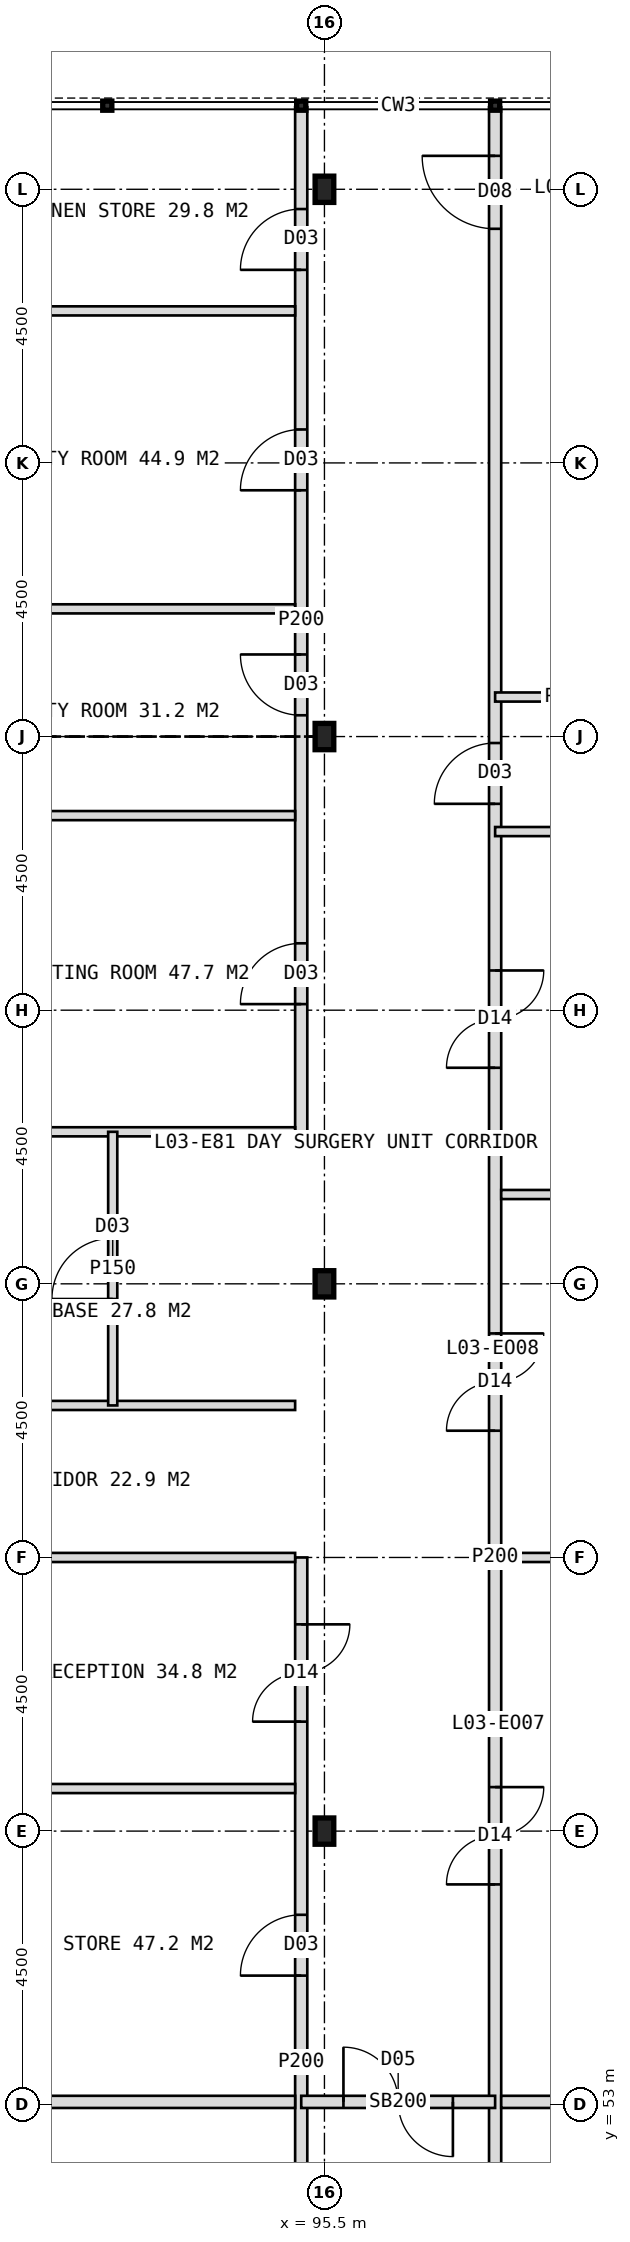
"""IFC4 building model, lengths in metres.
Left out: names, types, materials, properties, quantities, classifications, styles, units other than length and angle.
Written with IfcOpenShell. Run it as: python <this file> out.ifc"""

import sys

from ifc_helpers import new_model, si_unit, direction, frame, frame_2d, origin, origin_2d, place, context, subcontext, project, spatial, rectangle, i_section, extrude, element, fill, save


model = new_model("IFC4")
c1 = context("Model", 3, precision=1e-05, world=origin(), true_north=direction((0.0, 1.0)))
c2 = subcontext(c1, "Body", "Model", "MODEL_VIEW")
j1 = project(units=[si_unit("LENGTHUNIT", "METRE"), si_unit("PLANEANGLEUNIT", "RADIAN")], contexts=[c1])
p1 = place(None, origin())
s1 = spatial("IfcSite", under=j1, at=p1, CompositionType="ELEMENT")
p2 = place(p1, origin())
s2 = spatial("IfcBuilding", under=s1, at=p2, CompositionType="ELEMENT")
p3 = place(p2, frame((0.0, 0.0, 16.5)))
s3 = spatial("IfcBuildingStorey", under=s2, at=p3, CompositionType="ELEMENT", Elevation=16.5)
for number, where, z_axis, x_axis in (
    (1, (95.5, 57.5, 0.0), (0.0, 0.0, 1.0), (1.0, 0.0, 0.0)),
    (2, (95.5, 66.5, 0.0), (0.0, 0.0, 1.0), (1.0, 0.0, 0.0)),
    (3, (95.5, 75.5, 0.0), (0.0, 0.0, 1.0), (1.0, 0.0, 0.0)),
    (4, (95.5, 84.5, 0.0), (0.0, 0.0, 1.0), (1.0, 0.0, 0.0)),
):
    element("IfcColumn", number, at=place(p3, frame(where, z_axis=z_axis, x_axis=x_axis)), inside=s3, PredefinedType="COLUMN", context=c2, shape_type="SweptSolid", body=[
        extrude(i_section(OverallWidth=0.307, OverallDepth=0.432, WebThickness=0.021, FlangeThickness=0.04, FilletRadius=0.027, at=origin_2d()), origin(), (0.0, 0.0, 1.0), 4.5),
    ])
p4 = place(p3, frame((98.307, 38.15, 0.0), z_axis=(0.0, 0.0, 1.0), x_axis=(0.0, 1.0, 0.0)))
e5 = element("IfcWall", 5, at=p4, inside=s3, PredefinedType="PARTITIONING", context=c2, shape_type="SweptSolid", body=[
    extrude(rectangle(XDim=47.7, YDim=0.2, at=frame_2d((23.85, 0.0))), origin(), (0.0, 0.0, 1.0), 4.2),
])
p5 = place(p4, frame((45.7, 0.0, 0.0)))
e6 = element("IfcOpeningElement", 6, at=p5, cuts=e5, PredefinedType="OPENING", context=c2, shape_type="SweptSolid", body=[
    extrude(rectangle(XDim=1.2, YDim=2.1, at=frame_2d((0.6, 1.05))), frame((0.0, 0.11, 0.0), z_axis=(0.0, -1.0, 0.0), x_axis=(1.0, 0.0, 0.0)), (0.0, 0.0, 1.0), 0.22),
])
p6 = place(p4, frame((36.244, 0.0, 0.0)))
e7 = element("IfcOpeningElement", 7, at=p6, cuts=e5, PredefinedType="OPENING", context=c2, shape_type="SweptSolid", body=[
    extrude(rectangle(XDim=1.0, YDim=2.1, at=frame_2d((0.5, 1.05))), frame((0.0, 0.11, 0.0), z_axis=(0.0, -1.0, 0.0), x_axis=(1.0, 0.0, 0.0)), (0.0, 0.0, 1.0), 0.22),
])
p7 = place(p4, frame((0.73, 0.0, 0.0)))
e8 = element("IfcOpeningElement", 8, at=p7, cuts=e5, PredefinedType="OPENING", context=c2, shape_type="SweptSolid", body=[
    extrude(rectangle(XDim=1.4, YDim=2.2, at=frame_2d((0.7, 1.1))), frame((0.0, 0.11, 0.0), z_axis=(0.0, -1.0, 0.0), x_axis=(1.0, 0.0, 0.0)), (0.0, 0.0, 1.0), 0.22),
])
p8 = place(p4, frame((5.144, 0.0, 0.0)))
e9 = element("IfcOpeningElement", 9, at=p8, cuts=e5, PredefinedType="OPENING", context=c2, shape_type="SweptSolid", body=[
    extrude(rectangle(XDim=1.4, YDim=2.2, at=frame_2d((0.7, 1.1))), frame((0.0, 0.11, 0.0), z_axis=(0.0, -1.0, 0.0), x_axis=(1.0, 0.0, 0.0)), (0.0, 0.0, 1.0), 0.22),
])
p9 = place(p4, frame((9.82, 0.0, 0.0)))
e10 = element("IfcOpeningElement", 10, at=p9, cuts=e5, PredefinedType="OPENING", context=c2, shape_type="SweptSolid", body=[
    extrude(rectangle(XDim=1.0, YDim=2.1, at=frame_2d((0.5, 1.05))), frame((0.0, 0.11, 0.0), z_axis=(0.0, -1.0, 0.0), x_axis=(1.0, 0.0, 0.0)), (0.0, 0.0, 1.0), 0.22),
])
p10 = place(p4, frame((12.805, 0.0, 0.0)))
e11 = element("IfcOpeningElement", 11, at=p10, cuts=e5, PredefinedType="OPENING", context=c2, shape_type="SweptSolid", body=[
    extrude(rectangle(XDim=1.0, YDim=2.1, at=frame_2d((0.5, 1.05))), frame((0.0, 0.11, 0.0), z_axis=(0.0, -1.0, 0.0), x_axis=(1.0, 0.0, 0.0)), (0.0, 0.0, 1.0), 0.22),
])
p11 = place(p4, frame((18.473, 0.0, 0.0)))
e12 = element("IfcOpeningElement", 12, at=p11, cuts=e5, PredefinedType="OPENING", context=c2, shape_type="SweptSolid", body=[
    extrude(rectangle(XDim=1.6, YDim=2.2, at=frame_2d((0.8, 1.1))), frame((0.0, 0.11, 0.0), z_axis=(0.0, -1.0, 0.0), x_axis=(1.0, 0.0, 0.0)), (0.0, 0.0, 1.0), 0.22),
])
p12 = place(p4, frame((25.934, 0.0, 0.0)))
e13 = element("IfcOpeningElement", 13, at=p12, cuts=e5, PredefinedType="OPENING", context=c2, shape_type="SweptSolid", body=[
    extrude(rectangle(XDim=1.6, YDim=2.2, at=frame_2d((0.8, 1.1))), frame((0.0, 0.11, 0.0), z_axis=(0.0, -1.0, 0.0), x_axis=(1.0, 0.0, 0.0)), (0.0, 0.0, 1.0), 0.22),
])
p13 = place(p4, frame((31.903, 0.0, 0.0)))
e14 = element("IfcOpeningElement", 14, at=p13, cuts=e5, PredefinedType="OPENING", context=c2, shape_type="SweptSolid", body=[
    extrude(rectangle(XDim=1.6, YDim=2.2, at=frame_2d((0.8, 1.1))), frame((0.0, 0.11, 0.0), z_axis=(0.0, -1.0, 0.0), x_axis=(1.0, 0.0, 0.0)), (0.0, 0.0, 1.0), 0.22),
])
p14 = place(p3, frame((95.118, 45.4, 0.0), z_axis=(0.0, 0.0, 1.0), x_axis=(0.0, 1.0, 0.0)))
e15 = element("IfcWall", 15, at=p14, inside=s3, PredefinedType="PARTITIONING", context=c2, shape_type="SweptSolid", body=[
    extrude(rectangle(XDim=16.6, YDim=0.2, at=frame_2d((8.3, 0.0))), origin(), (0.0, 0.0, 1.0), 4.2),
])
p15 = place(p14, frame((1.65, 0.0, 0.0)))
e16 = element("IfcOpeningElement", 16, at=p15, cuts=e15, PredefinedType="OPENING", context=c2, shape_type="SweptSolid", body=[
    extrude(rectangle(XDim=1.0, YDim=2.1, at=frame_2d((0.5, 1.05))), frame((0.0, 0.11, 0.0), z_axis=(0.0, -1.0, 0.0), x_axis=(1.0, 0.0, 0.0)), (0.0, 0.0, 1.0), 0.22),
])
p16 = place(p14, frame((5.473, 0.0, 0.0)))
e17 = element("IfcOpeningElement", 17, at=p16, cuts=e15, PredefinedType="OPENING", context=c2, shape_type="SweptSolid", body=[
    extrude(rectangle(XDim=1.0, YDim=2.1, at=frame_2d((0.5, 1.05))), frame((0.0, 0.11, 0.0), z_axis=(0.0, -1.0, 0.0), x_axis=(1.0, 0.0, 0.0)), (0.0, 0.0, 1.0), 0.22),
])
p17 = place(p14, frame((9.723, 0.0, 0.0)))
e18 = element("IfcOpeningElement", 18, at=p17, cuts=e15, PredefinedType="OPENING", context=c2, shape_type="SweptSolid", body=[
    extrude(rectangle(XDim=1.0, YDim=2.1, at=frame_2d((0.5, 1.05))), frame((0.0, 0.11, 0.0), z_axis=(0.0, -1.0, 0.0), x_axis=(1.0, 0.0, 0.0)), (0.0, 0.0, 1.0), 0.22),
])
p18 = place(p14, frame((13.9, 0.0, 0.0)))
e19 = element("IfcOpeningElement", 19, at=p18, cuts=e15, PredefinedType="OPENING", context=c2, shape_type="SweptSolid", body=[
    extrude(rectangle(XDim=1.6, YDim=2.2, at=frame_2d((0.8, 1.1))), frame((0.0, 0.11, 0.0), z_axis=(0.0, -1.0, 0.0), x_axis=(1.0, 0.0, 0.0)), (0.0, 0.0, 1.0), 0.22),
])
p19 = place(p3, frame((95.118, 69.0, 0.0), z_axis=(0.0, 0.0, 1.0), x_axis=(0.0, 1.0, 0.0)))
e20 = element("IfcWall", 20, at=p19, inside=s3, PredefinedType="PARTITIONING", context=c2, shape_type="SweptSolid", body=[
    extrude(rectangle(XDim=16.85, YDim=0.2, at=frame_2d((8.425, 0.0))), origin(), (0.0, 0.0, 1.0), 4.2),
])
p20 = place(p19, frame((2.1, 0.0, 0.0)))
e21 = element("IfcOpeningElement", 21, at=p20, cuts=e20, PredefinedType="OPENING", context=c2, shape_type="SweptSolid", body=[
    extrude(rectangle(XDim=1.0, YDim=2.1, at=frame_2d((0.5, 1.05))), frame((0.0, 0.11, 0.0), z_axis=(0.0, -1.0, 0.0), x_axis=(1.0, 0.0, 0.0)), (0.0, 0.0, 1.0), 0.22),
])
p21 = place(p19, frame((6.85, 0.0, 0.0)))
e22 = element("IfcOpeningElement", 22, at=p21, cuts=e20, PredefinedType="OPENING", context=c2, shape_type="SweptSolid", body=[
    extrude(rectangle(XDim=1.0, YDim=2.1, at=frame_2d((0.5, 1.05))), frame((0.0, 0.11, 0.0), z_axis=(0.0, -1.0, 0.0), x_axis=(1.0, 0.0, 0.0)), (0.0, 0.0, 1.0), 0.22),
])
p22 = place(p19, frame((10.55, 0.0, 0.0)))
e23 = element("IfcOpeningElement", 23, at=p22, cuts=e20, PredefinedType="OPENING", context=c2, shape_type="SweptSolid", body=[
    extrude(rectangle(XDim=1.0, YDim=2.1, at=frame_2d((0.5, 1.05))), frame((0.0, 0.11, 0.0), z_axis=(0.0, -1.0, 0.0), x_axis=(1.0, 0.0, 0.0)), (0.0, 0.0, 1.0), 0.22),
])
p23 = place(p19, frame((14.175, 0.0, 0.0)))
e24 = element("IfcOpeningElement", 24, at=p23, cuts=e20, PredefinedType="OPENING", context=c2, shape_type="SweptSolid", body=[
    extrude(rectangle(XDim=1.0, YDim=2.1, at=frame_2d((0.5, 1.05))), frame((0.0, 0.11, 0.0), z_axis=(0.0, -1.0, 0.0), x_axis=(1.0, 0.0, 0.0)), (0.0, 0.0, 1.0), 0.22),
])
p24 = place(p3, frame((98.307, 53.047, 0.0), z_axis=(0.0, 0.0, 1.0), x_axis=(-1.0, 0.0, 0.0)))
e25 = element("IfcWall", 25, at=p24, inside=s3, PredefinedType="SOLIDWALL", context=c2, shape_type="SweptSolid", body=[
    extrude(rectangle(XDim=3.189, YDim=0.2, at=frame_2d((1.594, 0.0))), origin(), (0.0, 0.0, 1.0), 4.2),
])
p25 = place(p24, frame((0.695, 0.0, 0.0)))
e26 = element("IfcOpeningElement", 26, at=p25, cuts=e25, PredefinedType="OPENING", context=c2, shape_type="SweptSolid", body=[
    extrude(rectangle(XDim=1.8, YDim=2.2, at=frame_2d((0.9, 1.1))), frame((0.0, 0.11, 0.0), z_axis=(0.0, -1.0, 0.0), x_axis=(1.0, 0.0, 0.0)), (0.0, 0.0, 1.0), 0.22),
])
p26 = place(p3, frame((100.7, 76.15, 0.0), z_axis=(0.0, 0.0, 1.0), x_axis=(-1.0, 0.0, 0.0)))
e27 = element("IfcWall", 27, at=p26, inside=s3, PredefinedType="PARTITIONING", context=c2, shape_type="SweptSolid", body=[
    extrude(rectangle(XDim=2.393, YDim=0.15, at=frame_2d((1.197, 0.0))), origin(), (0.0, 0.0, 1.0), 4.2),
])
p27 = place(p3, frame((107.85, 73.938, 0.0), z_axis=(0.0, 0.0, 1.0), x_axis=(-1.0, 0.0, 0.0)))
e28 = element("IfcWall", 28, at=p27, inside=s3, PredefinedType="PARTITIONING", context=c2, shape_type="SweptSolid", body=[
    extrude(rectangle(XDim=9.543, YDim=0.15, at=frame_2d((4.771, 0.0))), origin(), (0.0, 0.0, 1.0), 4.2),
])
p28 = place(p3, frame((107.85, 53.047, 0.0), z_axis=(0.0, 0.0, 1.0), x_axis=(-1.0, 0.0, 0.0)))
e29 = element("IfcWall", 29, at=p28, inside=s3, PredefinedType="SOLIDWALL", context=c2, shape_type="SweptSolid", body=[
    extrude(rectangle(XDim=9.443, YDim=0.2, at=frame_2d((4.722, 0.0))), origin(), (0.0, 0.0, 1.0), 4.2),
])
for number, where, z_axis, x_axis in (
    (30, (107.85, 62.0, 0.0), (0.0, 0.0, 1.0), (-1.0, 0.0, 0.0)),
    (31, (107.85, 67.969, 0.0), (0.0, 0.0, 1.0), (-1.0, 0.0, 0.0)),
):
    element("IfcWall", number, at=place(p3, frame(where, z_axis=z_axis, x_axis=x_axis)), inside=s3, PredefinedType="PARTITIONING", context=c2, shape_type="SweptSolid", body=[
        extrude(rectangle(XDim=9.443, YDim=0.15, at=frame_2d((4.722, 0.0))), origin(), (0.0, 0.0, 1.0), 4.2),
    ])
p29 = place(p3, frame((95.018, 53.047, 0.0), z_axis=(0.0, 0.0, 1.0), x_axis=(-1.0, 0.0, 0.0)))
e32 = element("IfcWall", 32, at=p29, inside=s3, PredefinedType="SOLIDWALL", context=c2, shape_type="SweptSolid", body=[
    extrude(rectangle(XDim=9.168, YDim=0.2, at=frame_2d((4.584, 0.0))), origin(), (0.0, 0.0, 1.0), 4.2),
])
for number, where, z_axis, x_axis in (
    (33, (95.018, 58.2, 0.0), (0.0, 0.0, 1.0), (-1.0, 0.0, 0.0)),
    (34, (95.018, 62.0, 0.0), (0.0, 0.0, 1.0), (-1.0, 0.0, 0.0)),
    (35, (95.018, 64.5, 0.0), (0.0, 0.0, 1.0), (-1.0, 0.0, 0.0)),
    (36, (95.018, 69.0, 0.0), (0.0, 0.0, 1.0), (-1.0, 0.0, 0.0)),
    (37, (95.018, 74.2, 0.0), (0.0, 0.0, 1.0), (-1.0, 0.0, 0.0)),
    (38, (95.018, 77.6, 0.0), (0.0, 0.0, 1.0), (-1.0, 0.0, 0.0)),
    (39, (95.018, 82.5, 0.0), (0.0, 0.0, 1.0), (-1.0, 0.0, 0.0)),
):
    element("IfcWall", number, at=place(p3, frame(where, z_axis=z_axis, x_axis=x_axis)), inside=s3, PredefinedType="PARTITIONING", context=c2, shape_type="SweptSolid", body=[
        extrude(rectangle(XDim=9.168, YDim=0.15, at=frame_2d((4.584, 0.0))), origin(), (0.0, 0.0, 1.0), 4.2),
    ])
p30 = place(p3, frame((92.018, 64.5, 0.0), z_axis=(0.0, 0.0, 1.0), x_axis=(0.0, 1.0, 0.0)))
e40 = element("IfcWall", 40, at=p30, inside=s3, PredefinedType="PARTITIONING", context=c2, shape_type="SweptSolid", body=[
    extrude(rectangle(XDim=4.5, YDim=0.15, at=frame_2d((2.25, 0.0))), origin(), (0.0, 0.0, 1.0), 4.2),
])
p31 = place(p30, frame((1.75, 0.0, 0.0)))
e41 = element("IfcOpeningElement", 41, at=p31, cuts=e40, PredefinedType="OPENING", context=c2, shape_type="SweptSolid", body=[
    extrude(rectangle(XDim=1.0, YDim=2.1, at=frame_2d((0.5, 1.05))), frame((0.0, 0.085, 0.0), z_axis=(0.0, -1.0, 0.0), x_axis=(1.0, 0.0, 0.0)), (0.0, 0.0, 1.0), 0.17),
])
p32 = place(p25, origin())
e42 = element("IfcDoor", 42, at=p32, inside=s3, OperationType="DOUBLE_DOOR_DOUBLE_SWING", PredefinedType="DOOR", context=c2, shape_type="SweptSolid", body=[
    extrude(rectangle(XDim=1.8, YDim=2.2, at=frame_2d((0.9, 1.1))), frame((0.0, 0.025, 0.0), z_axis=(0.0, -1.0, 0.0), x_axis=(1.0, 0.0, 0.0)), (0.0, 0.0, 1.0), 0.05),
])
fill(e26, e42)
p33 = place(p5, origin())
e43 = element("IfcDoor", 43, at=p33, inside=s3, OperationType="SINGLE_SWING_RIGHT", PredefinedType="DOOR", context=c2, shape_type="SweptSolid", body=[
    extrude(rectangle(XDim=1.2, YDim=2.1, at=frame_2d((0.6, 1.05))), frame((0.0, 0.025, 0.0), z_axis=(0.0, -1.0, 0.0), x_axis=(1.0, 0.0, 0.0)), (0.0, 0.0, 1.0), 0.05),
])
fill(e6, e43)
p34 = place(p6, origin())
e44 = element("IfcDoor", 44, at=p34, inside=s3, OperationType="SINGLE_SWING_LEFT", PredefinedType="DOOR", context=c2, shape_type="SweptSolid", body=[
    extrude(rectangle(XDim=1.0, YDim=2.1, at=frame_2d((0.5, 1.05))), frame((0.0, 0.025, 0.0), z_axis=(0.0, -1.0, 0.0), x_axis=(1.0, 0.0, 0.0)), (0.0, 0.0, 1.0), 0.05),
])
fill(e7, e44)
p35 = place(p11, origin())
e45 = element("IfcDoor", 45, at=p35, inside=s3, OperationType="DOUBLE_DOOR_DOUBLE_SWING", PredefinedType="DOOR", context=c2, shape_type="SweptSolid", body=[
    extrude(rectangle(XDim=1.6, YDim=2.2, at=frame_2d((0.8, 1.1))), frame((0.0, 0.025, 0.0), z_axis=(0.0, -1.0, 0.0), x_axis=(1.0, 0.0, 0.0)), (0.0, 0.0, 1.0), 0.05),
])
fill(e12, e45)
p36 = place(p12, origin())
e46 = element("IfcDoor", 46, at=p36, inside=s3, OperationType="DOUBLE_DOOR_DOUBLE_SWING", PredefinedType="DOOR", context=c2, shape_type="SweptSolid", body=[
    extrude(rectangle(XDim=1.6, YDim=2.2, at=frame_2d((0.8, 1.1))), frame((0.0, 0.025, 0.0), z_axis=(0.0, -1.0, 0.0), x_axis=(1.0, 0.0, 0.0)), (0.0, 0.0, 1.0), 0.05),
])
fill(e13, e46)
p37 = place(p13, origin())
e47 = element("IfcDoor", 47, at=p37, inside=s3, OperationType="DOUBLE_DOOR_DOUBLE_SWING", PredefinedType="DOOR", context=c2, shape_type="SweptSolid", body=[
    extrude(rectangle(XDim=1.6, YDim=2.2, at=frame_2d((0.8, 1.1))), frame((0.0, 0.025, 0.0), z_axis=(0.0, -1.0, 0.0), x_axis=(1.0, 0.0, 0.0)), (0.0, 0.0, 1.0), 0.05),
])
fill(e14, e47)
p38 = place(p17, origin())
e48 = element("IfcDoor", 48, at=p38, inside=s3, OperationType="SINGLE_SWING_LEFT", PredefinedType="DOOR", context=c2, shape_type="SweptSolid", body=[
    extrude(rectangle(XDim=1.0, YDim=2.1, at=frame_2d((0.5, 1.05))), frame((0.0, 0.025, 0.0), z_axis=(0.0, -1.0, 0.0), x_axis=(1.0, 0.0, 0.0)), (0.0, 0.0, 1.0), 0.05),
])
fill(e18, e48)
p39 = place(p18, origin())
e49 = element("IfcDoor", 49, at=p39, inside=s3, OperationType="DOUBLE_DOOR_DOUBLE_SWING", PredefinedType="DOOR", context=c2, shape_type="SweptSolid", body=[
    extrude(rectangle(XDim=1.6, YDim=2.2, at=frame_2d((0.8, 1.1))), frame((0.0, 0.025, 0.0), z_axis=(0.0, -1.0, 0.0), x_axis=(1.0, 0.0, 0.0)), (0.0, 0.0, 1.0), 0.05),
])
fill(e19, e49)
p40 = place(p31, origin())
e50 = element("IfcDoor", 50, at=p40, inside=s3, OperationType="SINGLE_SWING_LEFT", PredefinedType="DOOR", context=c2, shape_type="SweptSolid", body=[
    extrude(rectangle(XDim=1.0, YDim=2.1, at=frame_2d((0.5, 1.05))), frame((0.0, 0.025, 0.0), z_axis=(0.0, -1.0, 0.0), x_axis=(1.0, 0.0, 0.0)), (0.0, 0.0, 1.0), 0.05),
])
fill(e41, e50)
p41 = place(p20, origin())
e51 = element("IfcDoor", 51, at=p41, inside=s3, OperationType="SINGLE_SWING_LEFT", PredefinedType="DOOR", context=c2, shape_type="SweptSolid", body=[
    extrude(rectangle(XDim=1.0, YDim=2.1, at=frame_2d((0.5, 1.05))), frame((0.0, 0.025, 0.0), z_axis=(0.0, -1.0, 0.0), x_axis=(1.0, 0.0, 0.0)), (0.0, 0.0, 1.0), 0.05),
])
fill(e21, e51)
p42 = place(p21, origin())
e52 = element("IfcDoor", 52, at=p42, inside=s3, OperationType="SINGLE_SWING_RIGHT", PredefinedType="DOOR", context=c2, shape_type="SweptSolid", body=[
    extrude(rectangle(XDim=1.0, YDim=2.1, at=frame_2d((0.5, 1.05))), frame((0.0, 0.025, 0.0), z_axis=(0.0, -1.0, 0.0), x_axis=(1.0, 0.0, 0.0)), (0.0, 0.0, 1.0), 0.05),
])
fill(e22, e52)
p43 = place(p22, origin())
e53 = element("IfcDoor", 53, at=p43, inside=s3, OperationType="SINGLE_SWING_LEFT", PredefinedType="DOOR", context=c2, shape_type="SweptSolid", body=[
    extrude(rectangle(XDim=1.0, YDim=2.1, at=frame_2d((0.5, 1.05))), frame((0.0, 0.025, 0.0), z_axis=(0.0, -1.0, 0.0), x_axis=(1.0, 0.0, 0.0)), (0.0, 0.0, 1.0), 0.05),
])
fill(e23, e53)
p44 = place(p23, origin())
e54 = element("IfcDoor", 54, at=p44, inside=s3, OperationType="SINGLE_SWING_LEFT", PredefinedType="DOOR", context=c2, shape_type="SweptSolid", body=[
    extrude(rectangle(XDim=1.0, YDim=2.1, at=frame_2d((0.5, 1.05))), frame((0.0, 0.025, 0.0), z_axis=(0.0, -1.0, 0.0), x_axis=(1.0, 0.0, 0.0)), (0.0, 0.0, 1.0), 0.05),
])
fill(e24, e54)
save(model, sys.argv[1])
